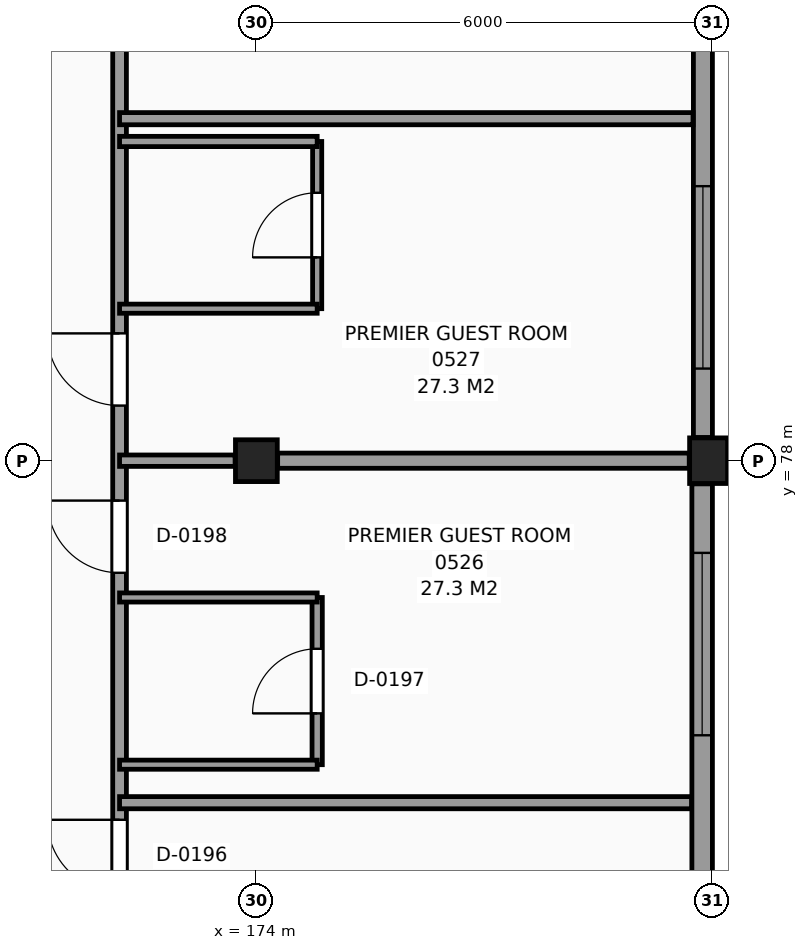
"""IFC4 building model, lengths in metres.
Left out: names, types, materials, properties, quantities, classifications, styles, units other than length and angle.
Written with IfcOpenShell. Run it as: python <this file> out.ifc"""

import sys

from ifc_helpers import new_model, si_unit, direction, frame, frame_2d, origin, origin_2d, place, context, subcontext, project, spatial, rectangle, extrude, element, fill, save


model = new_model("IFC4")
c1 = context("Model", 3, precision=1e-05, world=origin(), true_north=direction((0.0, 1.0)))
c2 = subcontext(c1, "Body", "Model", "MODEL_VIEW")
j1 = project(units=[si_unit("LENGTHUNIT", "METRE"), si_unit("PLANEANGLEUNIT", "RADIAN")], contexts=[c1])
p1 = place(None, origin())
s1 = spatial("IfcSite", under=j1, at=p1, CompositionType="ELEMENT")
p2 = place(p1, origin())
s2 = spatial("IfcBuilding", under=s1, at=p2, CompositionType="ELEMENT")
p3 = place(p2, frame((0.0, 0.0, 24.6)))
s3 = spatial("IfcBuildingStorey", under=s2, at=p3, CompositionType="ELEMENT", Elevation=24.6)
p4 = place(p3, frame((174.0, 78.0, 0.0), z_axis=(0.0, 0.0, 1.0), x_axis=(1.0, 0.0, 0.0)))
e1 = element("IfcColumn", 1, at=p4, inside=s3, PredefinedType="COLUMN", context=c2, shape_type="SweptSolid", body=[
    extrude(rectangle(XDim=0.55, YDim=0.55, at=origin_2d()), origin(), (0.0, 0.0, 1.0), 3.6),
])
p5 = place(p3, frame((180.0, 78.0, 0.0), z_axis=(0.0, 0.0, 1.0), x_axis=(1.0, 0.0, 0.0)))
e2 = element("IfcColumn", 2, at=p5, inside=s3, PredefinedType="COLUMN", context=c2, shape_type="SweptSolid", body=[
    extrude(rectangle(XDim=0.6, YDim=0.6, at=origin_2d()), origin(), (0.0, 0.0, 1.0), 3.6),
])
p6 = place(p3, frame((179.865, 72.305, 0.0), z_axis=(0.0, 0.0, 1.0), x_axis=(0.0, 1.0, 0.0)))
e3 = element("IfcWall", 3, at=p6, inside=s3, PredefinedType="SOLIDWALL", context=c2, shape_type="SweptSolid", body=[
    extrude(rectangle(XDim=5.39, YDim=0.27, at=frame_2d((2.695, 0.0))), origin(), (0.0, 0.0, 1.0), 2.73),
])
p7 = place(p6, frame((2.082, 0.0, 0.8)))
e4 = element("IfcOpeningElement", 4, at=p7, cuts=e3, PredefinedType="OPENING", context=c2, shape_type="SweptSolid", body=[
    extrude(rectangle(XDim=2.4, YDim=1.75, at=frame_2d((1.2, 0.875))), frame((0.0, 0.145, 0.0), z_axis=(0.0, -1.0, 0.0), x_axis=(1.0, 0.0, 0.0)), (0.0, 0.0, 1.0), 0.29),
])
p8 = place(p3, frame((179.875, 78.305, 0.0), z_axis=(0.0, 0.0, 1.0), x_axis=(0.0, 1.0, 0.0)))
e5 = element("IfcWall", 5, at=p8, inside=s3, PredefinedType="SOLIDWALL", context=c2, shape_type="SweptSolid", body=[
    extrude(rectangle(XDim=5.39, YDim=0.25, at=frame_2d((2.695, 0.0))), origin(), (0.0, 0.0, 1.0), 2.73),
])
p9 = place(p8, frame((0.907, 0.0, 0.8)))
e6 = element("IfcOpeningElement", 6, at=p9, cuts=e5, PredefinedType="OPENING", context=c2, shape_type="SweptSolid", body=[
    extrude(rectangle(XDim=2.4, YDim=1.75, at=frame_2d((1.2, 0.875))), frame((0.0, 0.135, 0.0), z_axis=(0.0, -1.0, 0.0), x_axis=(1.0, 0.0, 0.0)), (0.0, 0.0, 1.0), 0.27),
])
p10 = place(p3, frame((172.2, 42.215, 0.0), z_axis=(0.0, 0.0, 1.0), x_axis=(0.0, 1.0, 0.0)))
e7 = element("IfcWall", 7, at=p10, inside=s3, PredefinedType="PARTITIONING", context=c2, shape_type="SweptSolid", body=[
    extrude(rectangle(XDim=65.605, YDim=0.18, at=frame_2d((32.802, 0.0))), origin(), (0.0, 0.0, 1.0), 3.38),
])
p11 = place(p10, frame((7.61, 0.0, 0.0)))
e8 = element("IfcOpeningElement", 8, at=p11, cuts=e7, PredefinedType="OPENING", context=c2, shape_type="SweptSolid", body=[
    extrude(rectangle(XDim=0.95, YDim=2.1, at=frame_2d((0.475, 1.05))), frame((0.0, 0.1, 0.0), z_axis=(0.0, -1.0, 0.0), x_axis=(1.0, 0.0, 0.0)), (0.0, 0.0, 1.0), 0.2),
])
p12 = place(p10, frame((12.11, 0.0, 0.0)))
e9 = element("IfcOpeningElement", 9, at=p12, cuts=e7, PredefinedType="OPENING", context=c2, shape_type="SweptSolid", body=[
    extrude(rectangle(XDim=0.95, YDim=2.1, at=frame_2d((0.475, 1.05))), frame((0.0, 0.1, 0.0), z_axis=(0.0, -1.0, 0.0), x_axis=(1.0, 0.0, 0.0)), (0.0, 0.0, 1.0), 0.2),
])
p13 = place(p10, frame((16.31, 0.0, 0.0)))
e10 = element("IfcOpeningElement", 10, at=p13, cuts=e7, PredefinedType="OPENING", context=c2, shape_type="SweptSolid", body=[
    extrude(rectangle(XDim=0.95, YDim=2.1, at=frame_2d((0.475, 1.05))), frame((0.0, 0.1, 0.0), z_axis=(0.0, -1.0, 0.0), x_axis=(1.0, 0.0, 0.0)), (0.0, 0.0, 1.0), 0.2),
])
p14 = place(p10, frame((25.61, 0.0, 0.0)))
e11 = element("IfcOpeningElement", 11, at=p14, cuts=e7, PredefinedType="OPENING", context=c2, shape_type="SweptSolid", body=[
    extrude(rectangle(XDim=0.95, YDim=2.1, at=frame_2d((0.475, 1.05))), frame((0.0, 0.1, 0.0), z_axis=(0.0, -1.0, 0.0), x_axis=(1.0, 0.0, 0.0)), (0.0, 0.0, 1.0), 0.2),
])
p15 = place(p10, frame((30.11, 0.0, 0.0)))
e12 = element("IfcOpeningElement", 12, at=p15, cuts=e7, PredefinedType="OPENING", context=c2, shape_type="SweptSolid", body=[
    extrude(rectangle(XDim=0.95, YDim=2.1, at=frame_2d((0.475, 1.05))), frame((0.0, 0.1, 0.0), z_axis=(0.0, -1.0, 0.0), x_axis=(1.0, 0.0, 0.0)), (0.0, 0.0, 1.0), 0.2),
])
p16 = place(p10, frame((34.31, 0.0, 0.0)))
e13 = element("IfcOpeningElement", 13, at=p16, cuts=e7, PredefinedType="OPENING", context=c2, shape_type="SweptSolid", body=[
    extrude(rectangle(XDim=0.95, YDim=2.1, at=frame_2d((0.475, 1.05))), frame((0.0, 0.1, 0.0), z_axis=(0.0, -1.0, 0.0), x_axis=(1.0, 0.0, 0.0)), (0.0, 0.0, 1.0), 0.2),
])
p17 = place(p10, frame((36.51, 0.0, 0.0)))
e14 = element("IfcOpeningElement", 14, at=p17, cuts=e7, PredefinedType="OPENING", context=c2, shape_type="SweptSolid", body=[
    extrude(rectangle(XDim=0.95, YDim=2.1, at=frame_2d((0.475, 1.05))), frame((0.0, 0.1, 0.0), z_axis=(0.0, -1.0, 0.0), x_axis=(1.0, 0.0, 0.0)), (0.0, 0.0, 1.0), 0.2),
])
p18 = place(p10, frame((42.51, 0.0, 0.0)))
e15 = element("IfcOpeningElement", 15, at=p18, cuts=e7, PredefinedType="OPENING", context=c2, shape_type="SweptSolid", body=[
    extrude(rectangle(XDim=0.95, YDim=2.1, at=frame_2d((0.475, 1.05))), frame((0.0, 0.1, 0.0), z_axis=(0.0, -1.0, 0.0), x_axis=(1.0, 0.0, 0.0)), (0.0, 0.0, 1.0), 0.2),
])
p19 = place(p10, frame((52.31, 0.0, 0.0)))
e16 = element("IfcOpeningElement", 16, at=p19, cuts=e7, PredefinedType="OPENING", context=c2, shape_type="SweptSolid", body=[
    extrude(rectangle(XDim=0.95, YDim=2.1, at=frame_2d((0.475, 1.05))), frame((0.0, 0.1, 0.0), z_axis=(0.0, -1.0, 0.0), x_axis=(1.0, 0.0, 0.0)), (0.0, 0.0, 1.0), 0.2),
])
p20 = place(p10, frame((54.51, 0.0, 0.0)))
e17 = element("IfcOpeningElement", 17, at=p20, cuts=e7, PredefinedType="OPENING", context=c2, shape_type="SweptSolid", body=[
    extrude(rectangle(XDim=0.95, YDim=2.1, at=frame_2d((0.475, 1.05))), frame((0.0, 0.1, 0.0), z_axis=(0.0, -1.0, 0.0), x_axis=(1.0, 0.0, 0.0)), (0.0, 0.0, 1.0), 0.2),
])
p21 = place(p10, frame((60.51, 0.0, 0.0)))
e18 = element("IfcOpeningElement", 18, at=p21, cuts=e7, PredefinedType="OPENING", context=c2, shape_type="SweptSolid", body=[
    extrude(rectangle(XDim=0.95, YDim=2.1, at=frame_2d((0.475, 1.05))), frame((0.0, 0.1, 0.0), z_axis=(0.0, -1.0, 0.0), x_axis=(1.0, 0.0, 0.0)), (0.0, 0.0, 1.0), 0.2),
])
p22 = place(p3, frame((174.8, 74.0, 0.0), z_axis=(0.0, 0.0, 1.0), x_axis=(0.0, 1.0, 0.0)))
e19 = element("IfcWall", 19, at=p22, inside=s3, PredefinedType="PARTITIONING", context=c2, shape_type="SweptSolid", body=[
    extrude(rectangle(XDim=2.2, YDim=0.135, at=frame_2d((1.1, 0.0))), origin(), (0.0, 0.0, 1.0), 3.38),
])
p23 = place(p22, frame((0.675, 0.0, 0.0)))
e20 = element("IfcOpeningElement", 20, at=p23, cuts=e19, PredefinedType="OPENING", context=c2, shape_type="SweptSolid", body=[
    extrude(rectangle(XDim=0.85, YDim=2.1, at=frame_2d((0.425, 1.05))), frame((0.0, 0.078, 0.0), z_axis=(0.0, -1.0, 0.0), x_axis=(1.0, 0.0, 0.0)), (0.0, 0.0, 1.0), 0.155),
])
p24 = place(p3, frame((174.8, 80.0, 0.0), z_axis=(0.0, 0.0, 1.0), x_axis=(0.0, 1.0, 0.0)))
e21 = element("IfcWall", 21, at=p24, inside=s3, PredefinedType="PARTITIONING", context=c2, shape_type="SweptSolid", body=[
    extrude(rectangle(XDim=2.2, YDim=0.12, at=frame_2d((1.1, 0.0))), origin(), (0.0, 0.0, 1.0), 3.38),
])
p25 = place(p24, frame((0.675, 0.0, 0.0)))
e22 = element("IfcOpeningElement", 22, at=p25, cuts=e21, PredefinedType="OPENING", context=c2, shape_type="SweptSolid", body=[
    extrude(rectangle(XDim=0.85, YDim=2.1, at=frame_2d((0.425, 1.05))), frame((0.0, 0.07, 0.0), z_axis=(0.0, -1.0, 0.0), x_axis=(1.0, 0.0, 0.0)), (0.0, 0.0, 1.0), 0.14),
])
p26 = place(p3, frame((172.2, 73.5, 0.0), z_axis=(0.0, 0.0, 1.0), x_axis=(1.0, 0.0, 0.0)))
e23 = element("IfcWall", 23, at=p26, inside=s3, PredefinedType="PARTITIONING", context=c2, shape_type="SweptSolid", body=[
    extrude(rectangle(XDim=7.525, YDim=0.16, at=frame_2d((3.763, 0.0))), origin(), (0.0, 0.0, 1.0), 3.38),
])
for number, where, z_axis, x_axis in (
    (24, (172.2, 74.0, 0.0), (0.0, 0.0, 1.0), (1.0, 0.0, 0.0)),
    (25, (172.2, 76.2, 0.0), (0.0, 0.0, 1.0), (1.0, 0.0, 0.0)),
):
    element("IfcWall", number, at=place(p3, frame(where, z_axis=z_axis, x_axis=x_axis)), inside=s3, PredefinedType="PARTITIONING", context=c2, shape_type="SweptSolid", body=[
        extrude(rectangle(XDim=2.6, YDim=0.12, at=frame_2d((1.3, 0.0))), origin(), (0.0, 0.0, 1.0), 3.38),
    ])
p27 = place(p3, frame((172.2, 78.0, 0.0), z_axis=(0.0, 0.0, 1.0), x_axis=(1.0, 0.0, 0.0)))
e26 = element("IfcWall", 26, at=p27, inside=s3, PredefinedType="PARTITIONING", context=c2, shape_type="SweptSolid", body=[
    extrude(rectangle(XDim=1.52, YDim=0.15, at=frame_2d((0.76, 0.0))), origin(), (0.0, 0.0, 1.0), 2.58),
])
p28 = place(p3, frame((174.28, 78.0, 0.0), z_axis=(0.0, 0.0, 1.0), x_axis=(1.0, 0.0, 0.0)))
e27 = element("IfcWall", 27, at=p28, inside=s3, PredefinedType="PARTITIONING", context=c2, shape_type="SweptSolid", body=[
    extrude(rectangle(XDim=5.415, YDim=0.2, at=frame_2d((2.708, 0.0))), origin(), (0.0, 0.0, 1.0), 2.58),
])
p29 = place(p3, frame((172.2, 80.0, 0.0), z_axis=(0.0, 0.0, 1.0), x_axis=(1.0, 0.0, 0.0)))
e28 = element("IfcWall", 28, at=p29, inside=s3, PredefinedType="PARTITIONING", context=c2, shape_type="SweptSolid", body=[
    extrude(rectangle(XDim=2.6, YDim=0.12, at=frame_2d((1.3, 0.0))), origin(), (0.0, 0.0, 1.0), 3.38),
])
p30 = place(p3, frame((172.2, 82.2, 0.0), z_axis=(0.0, 0.0, 1.0), x_axis=(1.0, 0.0, 0.0)))
e29 = element("IfcWall", 29, at=p30, inside=s3, PredefinedType="PARTITIONING", context=c2, shape_type="SweptSolid", body=[
    extrude(rectangle(XDim=2.6, YDim=0.135, at=frame_2d((1.3, 0.0))), origin(), (0.0, 0.0, 1.0), 3.38),
])
p31 = place(p3, frame((172.2, 82.5, 0.0), z_axis=(0.0, 0.0, 1.0), x_axis=(1.0, 0.0, 0.0)))
e30 = element("IfcWall", 30, at=p31, inside=s3, PredefinedType="PARTITIONING", context=c2, shape_type="SweptSolid", body=[
    extrude(rectangle(XDim=7.545, YDim=0.16, at=frame_2d((3.772, 0.0))), origin(), (0.0, 0.0, 1.0), 3.38),
])
p32 = place(p7, origin())
e31 = element("IfcWindow", 31, at=p32, inside=s3, PartitioningType="SINGLE_PANEL", PredefinedType="WINDOW", context=c2, shape_type="SweptSolid", body=[
    extrude(rectangle(XDim=2.4, YDim=1.75, at=frame_2d((1.2, 0.875))), frame((0.0, 0.03, 0.0), z_axis=(0.0, -1.0, 0.0), x_axis=(1.0, 0.0, 0.0)), (0.0, 0.0, 1.0), 0.06),
])
fill(e4, e31)
p33 = place(p9, origin())
e32 = element("IfcWindow", 32, at=p33, inside=s3, PartitioningType="SINGLE_PANEL", PredefinedType="WINDOW", context=c2, shape_type="SweptSolid", body=[
    extrude(rectangle(XDim=2.4, YDim=1.75, at=frame_2d((1.2, 0.875))), frame((0.0, 0.03, 0.0), z_axis=(0.0, -1.0, 0.0), x_axis=(1.0, 0.0, 0.0)), (0.0, 0.0, 1.0), 0.06),
])
fill(e6, e32)
p34 = place(p15, origin())
e33 = element("IfcDoor", 33, at=p34, inside=s3, OperationType="SINGLE_SWING_RIGHT", PredefinedType="DOOR", context=c2, shape_type="SweptSolid", body=[
    extrude(rectangle(XDim=0.95, YDim=2.1, at=frame_2d((0.475, 1.05))), frame((0.0, 0.025, 0.0), z_axis=(0.0, -1.0, 0.0), x_axis=(1.0, 0.0, 0.0)), (0.0, 0.0, 1.0), 0.05),
])
fill(e12, e33)
p35 = place(p23, origin())
e34 = element("IfcDoor", 34, at=p35, inside=s3, OperationType="SINGLE_SWING_LEFT", PredefinedType="DOOR", context=c2, shape_type="SweptSolid", body=[
    extrude(rectangle(XDim=0.85, YDim=2.1, at=frame_2d((0.425, 1.05))), frame((0.0, 0.025, 0.0), z_axis=(0.0, -1.0, 0.0), x_axis=(1.0, 0.0, 0.0)), (0.0, 0.0, 1.0), 0.05),
])
fill(e20, e34)
p36 = place(p16, origin())
e35 = element("IfcDoor", 35, at=p36, inside=s3, OperationType="SINGLE_SWING_RIGHT", PredefinedType="DOOR", context=c2, shape_type="SweptSolid", body=[
    extrude(rectangle(XDim=0.95, YDim=2.1, at=frame_2d((0.475, 1.05))), frame((0.0, 0.025, 0.0), z_axis=(0.0, -1.0, 0.0), x_axis=(1.0, 0.0, 0.0)), (0.0, 0.0, 1.0), 0.05),
])
fill(e13, e35)
p37 = place(p25, origin())
e36 = element("IfcDoor", 36, at=p37, inside=s3, OperationType="SINGLE_SWING_LEFT", PredefinedType="DOOR", context=c2, shape_type="SweptSolid", body=[
    extrude(rectangle(XDim=0.85, YDim=2.1, at=frame_2d((0.425, 1.05))), frame((0.0, 0.025, 0.0), z_axis=(0.0, -1.0, 0.0), x_axis=(1.0, 0.0, 0.0)), (0.0, 0.0, 1.0), 0.05),
])
fill(e22, e36)
p38 = place(p17, origin())
e37 = element("IfcDoor", 37, at=p38, inside=s3, OperationType="SINGLE_SWING_RIGHT", PredefinedType="DOOR", context=c2, shape_type="SweptSolid", body=[
    extrude(rectangle(XDim=0.95, YDim=2.1, at=frame_2d((0.475, 1.05))), frame((0.0, 0.025, 0.0), z_axis=(0.0, -1.0, 0.0), x_axis=(1.0, 0.0, 0.0)), (0.0, 0.0, 1.0), 0.05),
])
fill(e14, e37)
save(model, sys.argv[1])
